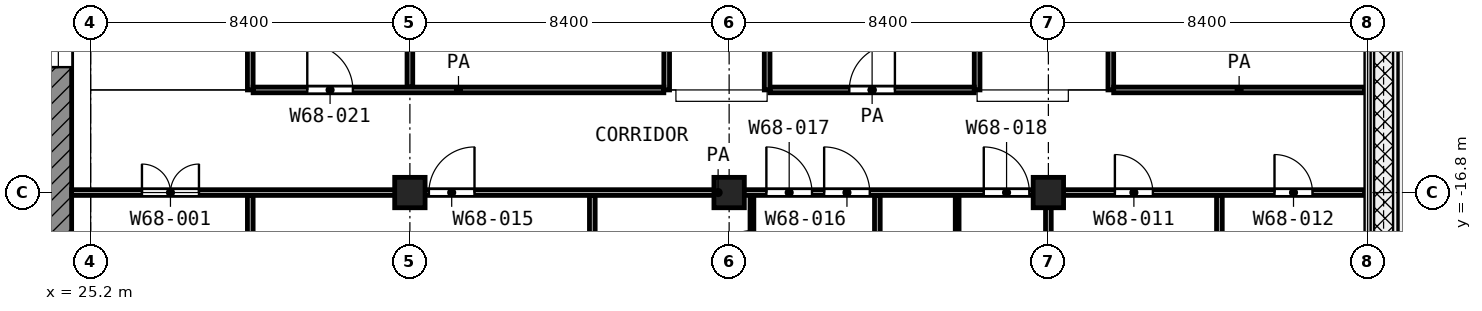
"""IFC4 building model, lengths in metres.
Left out: names, types, materials, properties, quantities, classifications, styles, units other than length and angle.
Written with IfcOpenShell. Run it as: python <this file> out.ifc"""

import sys

from ifc_helpers import new_model, si_unit, direction, frame, frame_2d, origin, origin_2d, place, context, subcontext, project, spatial, rectangle, extrude, element, fill, save


model = new_model("IFC4")
c1 = context("Model", 3, precision=1e-05, world=origin(), true_north=direction((0.0, 1.0)))
c2 = subcontext(c1, "Body", "Model", "MODEL_VIEW")
j1 = project(units=[si_unit("LENGTHUNIT", "METRE"), si_unit("PLANEANGLEUNIT", "RADIAN")], contexts=[c1])
p1 = place(None, origin())
s1 = spatial("IfcSite", under=j1, at=p1, CompositionType="ELEMENT")
p2 = place(p1, origin())
s2 = spatial("IfcBuilding", under=s1, at=p2, CompositionType="ELEMENT")
p3 = place(p2, frame((0.0, 0.0, 294.4)))
s3 = spatial("IfcBuildingStorey", under=s2, at=p3, CompositionType="ELEMENT", Elevation=294.4)
for number, where, z_axis, x_axis in (
    (1, (33.6, -16.8, 0.0), (0.0, 0.0, 1.0), (1.0, 0.0, 0.0)),
    (2, (42.0, -16.8, 0.0), (0.0, 0.0, 1.0), (1.0, 0.0, 0.0)),
    (3, (50.4, -16.8, 0.0), (0.0, 0.0, 1.0), (1.0, 0.0, 0.0)),
):
    element("IfcColumn", number, at=place(p3, frame(where, z_axis=z_axis, x_axis=x_axis)), inside=s3, PredefinedType="COLUMN", context=c2, shape_type="SweptSolid", body=[
        extrude(rectangle(XDim=0.8, YDim=0.8, at=origin_2d()), origin(), (0.0, 0.0, 1.0), 4.2),
    ])
p4 = place(p3, frame((24.35, -24.0, 0.0), z_axis=(0.0, 0.0, 1.0), x_axis=(0.0, 1.0, 0.0)))
e4 = element("IfcWall", 4, at=p4, inside=s3, PredefinedType="SHEAR", context=c2, shape_type="SweptSolid", body=[
    extrude(rectangle(XDim=18.6, YDim=0.7, at=frame_2d((9.3, 0.0))), origin(), (0.0, 0.0, 1.0), 3.6),
])
p5 = place(p4, frame((10.5, 0.0, 0.0)))
e5 = element("IfcOpeningElement", 5, at=p5, cuts=e4, PredefinedType="OPENING", context=c2, shape_type="SweptSolid", body=[
    extrude(rectangle(XDim=1.8, YDim=2.1, at=frame_2d((0.9, 1.05))), frame((0.0, 0.36, 0.0), z_axis=(0.0, -1.0, 0.0), x_axis=(1.0, 0.0, 0.0)), (0.0, 0.0, 1.0), 0.72),
])
p6 = place(p3, frame((42.6, -19.75, 0.0), z_axis=(0.0, 0.0, 1.0), x_axis=(0.0, 1.0, 0.0)))
e6 = element("IfcWall", 6, at=p6, inside=s3, PredefinedType="PARTITIONING", context=c2, shape_type="SweptSolid", body=[
    extrude(rectangle(XDim=2.875, YDim=0.1, at=frame_2d((1.438, 0.0))), origin(), (0.0, 0.0, 1.0), 3.6),
])
p7 = place(p6, frame((0.95, 0.0, 0.0)))
e7 = element("IfcOpeningElement", 7, at=p7, cuts=e6, PredefinedType="OPENING", context=c2, shape_type="SweptSolid", body=[
    extrude(rectangle(XDim=1.0, YDim=2.1, at=frame_2d((0.5, 1.05))), frame((0.0, 0.06, 0.0), z_axis=(0.0, -1.0, 0.0), x_axis=(1.0, 0.0, 0.0)), (0.0, 0.0, 1.0), 0.12),
])
p8 = place(p3, frame((48.0, -20.1, 0.0), z_axis=(0.0, 0.0, 1.0), x_axis=(0.0, 1.0, 0.0)))
e8 = element("IfcWall", 8, at=p8, inside=s3, PredefinedType="PARTITIONING", context=c2, shape_type="SweptSolid", body=[
    extrude(rectangle(XDim=3.225, YDim=0.1, at=frame_2d((1.613, 0.0))), origin(), (0.0, 0.0, 1.0), 3.6),
])
p9 = place(p3, frame((24.7, -16.8, 0.0), z_axis=(0.0, 0.0, 1.0), x_axis=(1.0, 0.0, 0.0)))
e9 = element("IfcWall", 9, at=p9, inside=s3, PredefinedType="PARTITIONING", context=c2, shape_type="SweptSolid", body=[
    extrude(rectangle(XDim=34.02, YDim=0.15, at=frame_2d((17.01, 0.0))), origin(), (0.0, 0.0, 1.0), 3.6),
])
p10 = place(p9, frame((1.85, 0.0, 0.0)))
e10 = element("IfcOpeningElement", 10, at=p10, cuts=e9, PredefinedType="OPENING", context=c2, shape_type="SweptSolid", body=[
    extrude(rectangle(XDim=1.5, YDim=2.1, at=frame_2d((0.75, 1.05))), frame((0.0, 0.085, 0.0), z_axis=(0.0, -1.0, 0.0), x_axis=(1.0, 0.0, 0.0)), (0.0, 0.0, 1.0), 0.17),
])
p11 = place(p9, frame((9.4, 0.0, 0.0)))
e11 = element("IfcOpeningElement", 11, at=p11, cuts=e9, PredefinedType="OPENING", context=c2, shape_type="SweptSolid", body=[
    extrude(rectangle(XDim=1.2, YDim=2.1, at=frame_2d((0.6, 1.05))), frame((0.0, 0.085, 0.0), z_axis=(0.0, -1.0, 0.0), x_axis=(1.0, 0.0, 0.0)), (0.0, 0.0, 1.0), 0.17),
])
p12 = place(p9, frame((19.8, 0.0, 0.0)))
e12 = element("IfcOpeningElement", 12, at=p12, cuts=e9, PredefinedType="OPENING", context=c2, shape_type="SweptSolid", body=[
    extrude(rectangle(XDim=1.2, YDim=2.1, at=frame_2d((0.6, 1.05))), frame((0.0, 0.085, 0.0), z_axis=(0.0, -1.0, 0.0), x_axis=(1.0, 0.0, 0.0)), (0.0, 0.0, 1.0), 0.17),
])
p13 = place(p9, frame((18.28, 0.0, 0.0)))
e13 = element("IfcOpeningElement", 13, at=p13, cuts=e9, PredefinedType="OPENING", context=c2, shape_type="SweptSolid", body=[
    extrude(rectangle(XDim=1.2, YDim=2.1, at=frame_2d((0.6, 1.05))), frame((0.0, 0.085, 0.0), z_axis=(0.0, -1.0, 0.0), x_axis=(1.0, 0.0, 0.0)), (0.0, 0.0, 1.0), 0.17),
])
p14 = place(p9, frame((24.0, 0.0, 0.0)))
e14 = element("IfcOpeningElement", 14, at=p14, cuts=e9, PredefinedType="OPENING", context=c2, shape_type="SweptSolid", body=[
    extrude(rectangle(XDim=1.2, YDim=2.1, at=frame_2d((0.6, 1.05))), frame((0.0, 0.085, 0.0), z_axis=(0.0, -1.0, 0.0), x_axis=(1.0, 0.0, 0.0)), (0.0, 0.0, 1.0), 0.17),
])
p15 = place(p9, frame((27.45, 0.0, 0.0)))
e15 = element("IfcOpeningElement", 15, at=p15, cuts=e9, PredefinedType="OPENING", context=c2, shape_type="SweptSolid", body=[
    extrude(rectangle(XDim=1.0, YDim=2.1, at=frame_2d((0.5, 1.05))), frame((0.0, 0.085, 0.0), z_axis=(0.0, -1.0, 0.0), x_axis=(1.0, 0.0, 0.0)), (0.0, 0.0, 1.0), 0.17),
])
p16 = place(p9, frame((31.65, 0.0, 0.0)))
e16 = element("IfcOpeningElement", 16, at=p16, cuts=e9, PredefinedType="OPENING", context=c2, shape_type="SweptSolid", body=[
    extrude(rectangle(XDim=1.0, YDim=2.1, at=frame_2d((0.5, 1.05))), frame((0.0, 0.085, 0.0), z_axis=(0.0, -1.0, 0.0), x_axis=(1.0, 0.0, 0.0)), (0.0, 0.0, 1.0), 0.17),
])
p17 = place(p3, frame((29.475, -14.1, 0.0), z_axis=(0.0, 0.0, 1.0), x_axis=(1.0, 0.0, 0.0)))
e17 = element("IfcWall", 17, at=p17, inside=s3, PredefinedType="PARTITIONING", context=c2, shape_type="SweptSolid", body=[
    extrude(rectangle(XDim=10.807, YDim=0.15, at=frame_2d((5.403, 0.0))), origin(), (0.0, 0.0, 1.0), 3.6),
])
p18 = place(p17, frame((1.425, 0.0, 0.0)))
e18 = element("IfcOpeningElement", 18, at=p18, cuts=e17, PredefinedType="OPENING", context=c2, shape_type="SweptSolid", body=[
    extrude(rectangle(XDim=1.2, YDim=2.1, at=frame_2d((0.6, 1.05))), frame((0.0, 0.085, 0.0), z_axis=(0.0, -1.0, 0.0), x_axis=(1.0, 0.0, 0.0)), (0.0, 0.0, 1.0), 0.17),
])
p19 = place(p3, frame((43.075, -14.1, 0.0), z_axis=(0.0, 0.0, 1.0), x_axis=(1.0, 0.0, 0.0)))
e19 = element("IfcWall", 19, at=p19, inside=s3, PredefinedType="PARTITIONING", context=c2, shape_type="SweptSolid", body=[
    extrude(rectangle(XDim=5.375, YDim=0.15, at=frame_2d((2.688, 0.0))), origin(), (0.0, 0.0, 1.0), 3.6),
])
p20 = place(p19, frame((2.087, 0.0, 0.0)))
e20 = element("IfcOpeningElement", 20, at=p20, cuts=e19, PredefinedType="OPENING", context=c2, shape_type="SweptSolid", body=[
    extrude(rectangle(XDim=1.2, YDim=2.1, at=frame_2d((0.6, 1.05))), frame((0.0, 0.085, 0.0), z_axis=(0.0, -1.0, 0.0), x_axis=(1.0, 0.0, 0.0)), (0.0, 0.0, 1.0), 0.17),
])
p21 = place(p3, frame((52.118, -14.1, 0.0), z_axis=(0.0, 0.0, 1.0), x_axis=(1.0, 0.0, 0.0)))
e21 = element("IfcWall", 21, at=p21, inside=s3, PredefinedType="PARTITIONING", context=c2, shape_type="SweptSolid", body=[
    extrude(rectangle(XDim=6.602, YDim=0.15, at=frame_2d((3.301, 0.0))), origin(), (0.0, 0.0, 1.0), 3.6),
])
p22 = place(p3, frame((29.4, -31.198, 0.0), z_axis=(0.0, 0.0, 1.0), x_axis=(0.0, 1.0, 0.0)))
e22 = element("IfcWall", 22, at=p22, inside=s3, PredefinedType="PARTITIONING", context=c2, shape_type="SweptSolid", body=[
    extrude(rectangle(XDim=14.323, YDim=0.15, at=frame_2d((7.162, 0.0))), origin(), (0.0, 0.0, 1.0), 3.6),
])
p23 = place(p3, frame((29.4, -14.1, 0.0), z_axis=(0.0, 0.0, 1.0), x_axis=(0.0, 1.0, 0.0)))
e23 = element("IfcWall", 23, at=p23, inside=s3, PredefinedType="PARTITIONING", context=c2, shape_type="SweptSolid", body=[
    extrude(rectangle(XDim=14.02, YDim=0.15, at=frame_2d((7.01, 0.0))), origin(), (0.0, 0.0, 1.0), 3.6),
])
p24 = place(p3, frame((33.6, -14.025, 0.0), z_axis=(0.0, 0.0, 1.0), x_axis=(0.0, 1.0, 0.0)))
e24 = element("IfcWall", 24, at=p24, inside=s3, PredefinedType="PARTITIONING", context=c2, shape_type="SweptSolid", body=[
    extrude(rectangle(XDim=13.945, YDim=0.15, at=frame_2d((6.972, 0.0))), origin(), (0.0, 0.0, 1.0), 3.6),
])
p25 = place(p3, frame((38.4, -25.12, 0.0), z_axis=(0.0, 0.0, 1.0), x_axis=(0.0, 1.0, 0.0)))
e25 = element("IfcWall", 25, at=p25, inside=s3, PredefinedType="PARTITIONING", context=c2, shape_type="SweptSolid", body=[
    extrude(rectangle(XDim=8.245, YDim=0.15, at=frame_2d((4.123, 0.0))), origin(), (0.0, 0.0, 1.0), 3.6),
])
p26 = place(p3, frame((40.357, -14.1, 0.0), z_axis=(0.0, 0.0, 1.0), x_axis=(0.0, 1.0, 0.0)))
e26 = element("IfcWall", 26, at=p26, inside=s3, PredefinedType="PARTITIONING", context=c2, shape_type="SweptSolid", body=[
    extrude(rectangle(XDim=14.02, YDim=0.15, at=frame_2d((7.01, 0.0))), origin(), (0.0, 0.0, 1.0), 3.6),
])
p27 = place(p26, frame((6.375, 0.0, 0.0)))
e27 = element("IfcOpeningElement", 27, at=p27, cuts=e26, PredefinedType="OPENING", context=c2, shape_type="SweptSolid", body=[
    extrude(rectangle(XDim=1.0, YDim=2.1, at=frame_2d((0.5, 1.05))), frame((0.0, 0.085, 0.0), z_axis=(0.0, -1.0, 0.0), x_axis=(1.0, 0.0, 0.0)), (0.0, 0.0, 1.0), 0.17),
])
p28 = place(p3, frame((43.0, -14.1, 0.0), z_axis=(0.0, 0.0, 1.0), x_axis=(0.0, 1.0, 0.0)))
e28 = element("IfcWall", 28, at=p28, inside=s3, PredefinedType="PARTITIONING", context=c2, shape_type="SweptSolid", body=[
    extrude(rectangle(XDim=5.298, YDim=0.15, at=frame_2d((2.649, 0.0))), origin(), (0.0, 0.0, 1.0), 3.6),
])
p29 = place(p3, frame((45.9, -25.12, 0.0), z_axis=(0.0, 0.0, 1.0), x_axis=(0.0, 1.0, 0.0)))
e29 = element("IfcWall", 29, at=p29, inside=s3, PredefinedType="PARTITIONING", context=c2, shape_type="SweptSolid", body=[
    extrude(rectangle(XDim=8.245, YDim=0.15, at=frame_2d((4.123, 0.0))), origin(), (0.0, 0.0, 1.0), 3.6),
])
p30 = place(p3, frame((48.525, -14.1, 0.0), z_axis=(0.0, 0.0, 1.0), x_axis=(0.0, 1.0, 0.0)))
e30 = element("IfcWall", 30, at=p30, inside=s3, PredefinedType="PARTITIONING", context=c2, shape_type="SweptSolid", body=[
    extrude(rectangle(XDim=5.45, YDim=0.15, at=frame_2d((2.725, 0.0))), origin(), (0.0, 0.0, 1.0), 3.6),
])
p31 = place(p3, frame((50.4, -25.12, 0.0), z_axis=(0.0, 0.0, 1.0), x_axis=(0.0, 1.0, 0.0)))
e31 = element("IfcWall", 31, at=p31, inside=s3, PredefinedType="PARTITIONING", context=c2, shape_type="SweptSolid", body=[
    extrude(rectangle(XDim=8.245, YDim=0.15, at=frame_2d((4.123, 0.0))), origin(), (0.0, 0.0, 1.0), 3.6),
])
p32 = place(p3, frame((52.043, -14.1, 0.0), z_axis=(0.0, 0.0, 1.0), x_axis=(0.0, 1.0, 0.0)))
e32 = element("IfcWall", 32, at=p32, inside=s3, PredefinedType="PARTITIONING", context=c2, shape_type="SweptSolid", body=[
    extrude(rectangle(XDim=12.248, YDim=0.15, at=frame_2d((6.124, 0.0))), origin(), (0.0, 0.0, 1.0), 3.6),
])
p33 = place(p32, frame((6.074, 0.0, 0.0)))
e33 = element("IfcOpeningElement", 33, at=p33, cuts=e32, PredefinedType="OPENING", context=c2, shape_type="SweptSolid", body=[
    extrude(rectangle(XDim=1.5, YDim=2.1, at=frame_2d((0.75, 1.05))), frame((0.0, 0.085, 0.0), z_axis=(0.0, -1.0, 0.0), x_axis=(1.0, 0.0, 0.0)), (0.0, 0.0, 1.0), 0.17),
])
p34 = place(p3, frame((54.9, -22.987, 0.0), z_axis=(0.0, 0.0, 1.0), x_axis=(0.0, 1.0, 0.0)))
e34 = element("IfcWall", 34, at=p34, inside=s3, PredefinedType="PARTITIONING", context=c2, shape_type="SweptSolid", body=[
    extrude(rectangle(XDim=6.112, YDim=0.15, at=frame_2d((3.056, 0.0))), origin(), (0.0, 0.0, 1.0), 3.6),
])
p35 = place(p5, origin())
e35 = element("IfcDoor", 35, at=p35, inside=s3, OperationType="DOUBLE_DOOR_SINGLE_SWING", PredefinedType="DOOR", context=c2, shape_type="SweptSolid", body=[
    extrude(rectangle(XDim=1.8, YDim=2.1, at=frame_2d((0.9, 1.05))), frame((0.0, 0.025, 0.0), z_axis=(0.0, -1.0, 0.0), x_axis=(1.0, 0.0, 0.0)), (0.0, 0.0, 1.0), 0.05),
])
fill(e5, e35)
p36 = place(p10, origin())
e36 = element("IfcDoor", 36, at=p36, inside=s3, OperationType="DOUBLE_DOOR_SINGLE_SWING", PredefinedType="DOOR", context=c2, shape_type="SweptSolid", body=[
    extrude(rectangle(XDim=1.5, YDim=2.1, at=frame_2d((0.75, 1.05))), frame((0.0, 0.025, 0.0), z_axis=(0.0, -1.0, 0.0), x_axis=(1.0, 0.0, 0.0)), (0.0, 0.0, 1.0), 0.05),
])
fill(e10, e36)
p37 = place(p20, origin())
e37 = element("IfcDoor", 37, at=p37, inside=s3, OperationType="SINGLE_SWING_RIGHT", PredefinedType="DOOR", context=c2, shape_type="SweptSolid", body=[
    extrude(rectangle(XDim=1.2, YDim=2.1, at=frame_2d((0.6, 1.05))), frame((0.0, 0.025, 0.0), z_axis=(0.0, -1.0, 0.0), x_axis=(1.0, 0.0, 0.0)), (0.0, 0.0, 1.0), 0.05),
])
fill(e20, e37)
p38 = place(p11, origin())
e38 = element("IfcDoor", 38, at=p38, inside=s3, OperationType="SINGLE_SWING_RIGHT", PredefinedType="DOOR", context=c2, shape_type="SweptSolid", body=[
    extrude(rectangle(XDim=1.2, YDim=2.1, at=frame_2d((0.6, 1.05))), frame((0.0, 0.025, 0.0), z_axis=(0.0, -1.0, 0.0), x_axis=(1.0, 0.0, 0.0)), (0.0, 0.0, 1.0), 0.05),
])
fill(e11, e38)
p39 = place(p12, origin())
e39 = element("IfcDoor", 39, at=p39, inside=s3, OperationType="SINGLE_SWING_LEFT", PredefinedType="DOOR", context=c2, shape_type="SweptSolid", body=[
    extrude(rectangle(XDim=1.2, YDim=2.1, at=frame_2d((0.6, 1.05))), frame((0.0, 0.025, 0.0), z_axis=(0.0, -1.0, 0.0), x_axis=(1.0, 0.0, 0.0)), (0.0, 0.0, 1.0), 0.05),
])
fill(e12, e39)
p40 = place(p13, origin())
e40 = element("IfcDoor", 40, at=p40, inside=s3, OperationType="SINGLE_SWING_LEFT", PredefinedType="DOOR", context=c2, shape_type="SweptSolid", body=[
    extrude(rectangle(XDim=1.2, YDim=2.1, at=frame_2d((0.6, 1.05))), frame((0.0, 0.025, 0.0), z_axis=(0.0, -1.0, 0.0), x_axis=(1.0, 0.0, 0.0)), (0.0, 0.0, 1.0), 0.05),
])
fill(e13, e40)
p41 = place(p14, origin())
e41 = element("IfcDoor", 41, at=p41, inside=s3, OperationType="SINGLE_SWING_LEFT", PredefinedType="DOOR", context=c2, shape_type="SweptSolid", body=[
    extrude(rectangle(XDim=1.2, YDim=2.1, at=frame_2d((0.6, 1.05))), frame((0.0, 0.025, 0.0), z_axis=(0.0, -1.0, 0.0), x_axis=(1.0, 0.0, 0.0)), (0.0, 0.0, 1.0), 0.05),
])
fill(e14, e41)
p42 = place(p15, origin())
e42 = element("IfcDoor", 42, at=p42, inside=s3, OperationType="SINGLE_SWING_LEFT", PredefinedType="DOOR", context=c2, shape_type="SweptSolid", body=[
    extrude(rectangle(XDim=1.0, YDim=2.1, at=frame_2d((0.5, 1.05))), frame((0.0, 0.025, 0.0), z_axis=(0.0, -1.0, 0.0), x_axis=(1.0, 0.0, 0.0)), (0.0, 0.0, 1.0), 0.05),
])
fill(e15, e42)
p43 = place(p16, origin())
e43 = element("IfcDoor", 43, at=p43, inside=s3, OperationType="SINGLE_SWING_LEFT", PredefinedType="DOOR", context=c2, shape_type="SweptSolid", body=[
    extrude(rectangle(XDim=1.0, YDim=2.1, at=frame_2d((0.5, 1.05))), frame((0.0, 0.025, 0.0), z_axis=(0.0, -1.0, 0.0), x_axis=(1.0, 0.0, 0.0)), (0.0, 0.0, 1.0), 0.05),
])
fill(e16, e43)
p44 = place(p18, origin())
e44 = element("IfcDoor", 44, at=p44, inside=s3, OperationType="SINGLE_SWING_LEFT", PredefinedType="DOOR", context=c2, shape_type="SweptSolid", body=[
    extrude(rectangle(XDim=1.2, YDim=2.1, at=frame_2d((0.6, 1.05))), frame((0.0, 0.025, 0.0), z_axis=(0.0, -1.0, 0.0), x_axis=(1.0, 0.0, 0.0)), (0.0, 0.0, 1.0), 0.05),
])
fill(e18, e44)
save(model, sys.argv[1])
